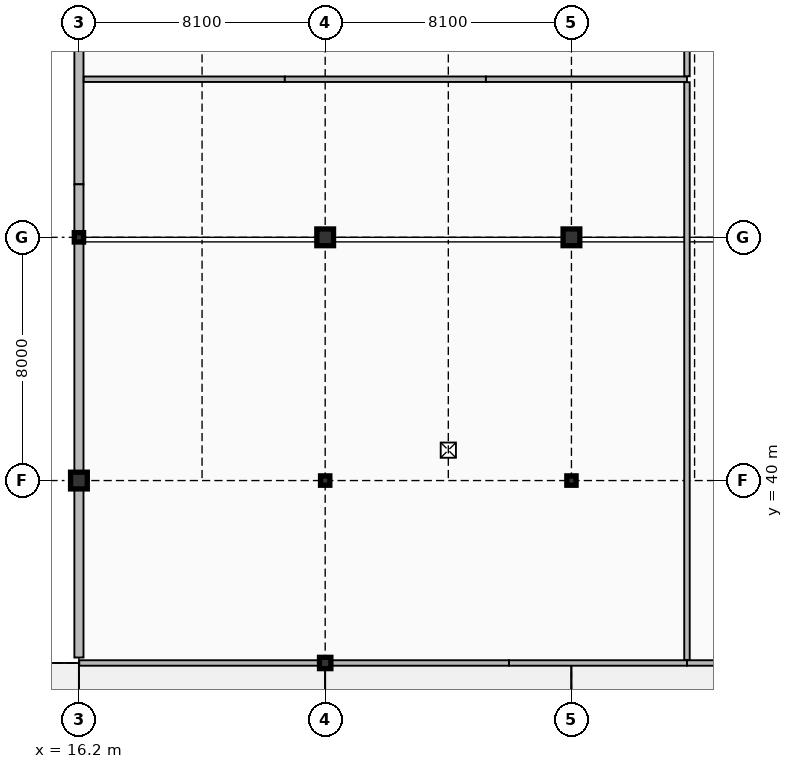
"""IFC4 building model, lengths in metres.
Left out: names, types, materials, properties, quantities, classifications, styles, units other than length and angle.
Written with IfcOpenShell. Run it as: python <this file> out.ifc"""

import sys

from ifc_helpers import new_model, si_unit, direction, frame, frame_2d, origin, origin_2d, place, context, subcontext, project, spatial, rectangle, i_section, extrude, element, fill, save


model = new_model("IFC4")
c1 = context("Model", 3, precision=1e-05, world=origin(), true_north=direction((0.0, 1.0)))
c2 = subcontext(c1, "Body", "Model", "MODEL_VIEW")
j1 = project(units=[si_unit("LENGTHUNIT", "METRE"), si_unit("PLANEANGLEUNIT", "RADIAN")], contexts=[c1])
p1 = place(None, origin())
s1 = spatial("IfcSite", under=j1, at=p1, CompositionType="ELEMENT")
p2 = place(p1, origin())
s2 = spatial("IfcBuilding", under=s1, at=p2, CompositionType="ELEMENT")
p3 = place(p2, frame((0.0, 0.0, 19.8)))
s3 = spatial("IfcBuildingStorey", under=s2, at=p3, CompositionType="ELEMENT", Elevation=19.8)
p4 = place(p3, frame((16.2, 40.0, 0.0), z_axis=(0.0, 0.0, 1.0), x_axis=(1.0, 0.0, 0.0)))
e1 = element("IfcColumn", 1, at=p4, inside=s3, PredefinedType="COLUMN", context=c2, shape_type="SweptSolid", body=[
    extrude(rectangle(XDim=0.55, YDim=0.55, at=origin_2d()), origin(), (0.0, 0.0, 1.0), 4.76),
])
p5 = place(p3, frame((16.2, 48.0, 0.0), z_axis=(0.0, 0.0, 1.0), x_axis=(1.0, 0.0, 0.0)))
e2 = element("IfcColumn", 2, at=p5, inside=s3, PredefinedType="COLUMN", context=c2, shape_type="SweptSolid", body=[
    extrude(i_section(OverallWidth=0.305, OverallDepth=0.308, WebThickness=0.01, FlangeThickness=0.015, FilletRadius=0.015, at=origin_2d()), origin(), (0.0, 0.0, 1.0), 5.1),
])
p6 = place(p3, frame((24.3, 34.0, 0.0), z_axis=(0.0, 0.0, 1.0), x_axis=(1.0, 0.0, 0.0)))
e3 = element("IfcColumn", 3, at=p6, inside=s3, PredefinedType="COLUMN", context=c2, shape_type="SweptSolid", body=[
    extrude(i_section(OverallWidth=0.374, OverallDepth=0.372, WebThickness=0.016, FlangeThickness=0.026, FilletRadius=0.016, at=origin_2d()), origin(), (0.0, 0.0, 1.0), 4.76),
])
p7 = place(p3, frame((24.3, 40.0, 0.0), z_axis=(0.0, 0.0, 1.0), x_axis=(1.0, 0.0, 0.0)))
e4 = element("IfcColumn", 4, at=p7, inside=s3, PredefinedType="COLUMN", context=c2, shape_type="SweptSolid", body=[
    extrude(i_section(OverallWidth=0.305, OverallDepth=0.308, WebThickness=0.01, FlangeThickness=0.015, FilletRadius=0.015, at=origin_2d()), origin(), (0.0, 0.0, 1.0), 4.76),
])
p8 = place(p3, frame((24.3, 48.0, 0.0), z_axis=(0.0, 0.0, 1.0), x_axis=(1.0, 0.0, 0.0)))
e5 = element("IfcColumn", 5, at=p8, inside=s3, PredefinedType="COLUMN", context=c2, shape_type="SweptSolid", body=[
    extrude(rectangle(XDim=0.55, YDim=0.55, at=origin_2d()), origin(), (0.0, 0.0, 1.0), 5.1),
])
p9 = place(p3, frame((32.4, 40.0, 0.0), z_axis=(0.0, 0.0, 1.0), x_axis=(1.0, 0.0, 0.0)))
e6 = element("IfcColumn", 6, at=p9, inside=s3, PredefinedType="COLUMN", context=c2, shape_type="SweptSolid", body=[
    extrude(i_section(OverallWidth=0.305, OverallDepth=0.308, WebThickness=0.01, FlangeThickness=0.015, FilletRadius=0.015, at=origin_2d()), origin(), (0.0, 0.0, 1.0), 4.76),
])
p10 = place(p3, frame((32.4, 48.0, 0.0), z_axis=(0.0, 0.0, 1.0), x_axis=(1.0, 0.0, 0.0)))
e7 = element("IfcColumn", 7, at=p10, inside=s3, PredefinedType="COLUMN", context=c2, shape_type="SweptSolid", body=[
    extrude(rectangle(XDim=0.55, YDim=0.55, at=origin_2d()), origin(), (0.0, 0.0, 1.0), 5.1),
])
p11 = place(p3, frame((16.2, 65.308, 0.0), z_axis=(0.0, 0.0, 1.0), x_axis=(0.0, -1.0, 0.0)))
e8 = element("IfcWall", 8, at=p11, inside=s3, PredefinedType="SOLIDWALL", context=c2, shape_type="SweptSolid", body=[
    extrude(rectangle(XDim=15.564, YDim=0.3, at=frame_2d((7.782, 0.0))), origin(), (0.0, 0.0, 1.0), 4.289),
])
p12 = place(p3, frame((16.2, 49.744, 0.0), z_axis=(0.0, 0.0, 1.0), x_axis=(0.0, -1.0, 0.0)))
e9 = element("IfcWall", 9, at=p12, inside=s3, PredefinedType="SOLIDWALL", context=c2, shape_type="SweptSolid", body=[
    extrude(rectangle(XDim=15.564, YDim=0.3, at=frame_2d((7.782, 0.0))), origin(), (0.0, 0.0, 1.0), 4.289),
])
p13 = place(p12, frame((4.5, 0.0, 0.95)))
e10 = element("IfcOpeningElement", 10, at=p13, cuts=e9, PredefinedType="OPENING", context=c2, shape_type="SweptSolid", body=[
    extrude(rectangle(XDim=1.5, YDim=1.8, at=frame_2d((0.75, 0.9))), frame((0.0, 0.16, 0.0), z_axis=(0.0, -1.0, 0.0), x_axis=(1.0, 0.0, 0.0)), (0.0, 0.0, 1.0), 0.32),
])
p14 = place(p3, frame((16.21, 34.0, 0.0), z_axis=(0.0, 0.0, 1.0), x_axis=(1.0, 0.0, 0.0)))
e11 = element("IfcWall", 11, at=p14, inside=s3, PredefinedType="PARTITIONING", context=c2, shape_type="SweptSolid", body=[
    extrude(rectangle(XDim=7.895, YDim=0.18, at=frame_2d((3.948, 0.0))), origin(), (0.0, 0.0, 1.0), 4.092),
])
p15 = place(p3, frame((24.495, 34.0, 0.0), z_axis=(0.0, 0.0, 1.0), x_axis=(1.0, 0.0, 0.0)))
e12 = element("IfcWall", 12, at=p15, inside=s3, PredefinedType="PARTITIONING", context=c2, shape_type="SweptSolid", body=[
    extrude(rectangle(XDim=5.852, YDim=0.18, at=frame_2d((2.926, 0.0))), origin(), (0.0, 0.0, 1.0), 4.092),
])
p16 = place(p3, frame((30.347, 34.0, 0.0), z_axis=(0.0, 0.0, 1.0), x_axis=(1.0, 0.0, 0.0)))
e13 = element("IfcWall", 13, at=p16, inside=s3, PredefinedType="PARTITIONING", context=c2, shape_type="SweptSolid", body=[
    extrude(rectangle(XDim=5.853, YDim=0.18, at=frame_2d((2.926, 0.0))), origin(), (0.0, 0.0, 1.0), 4.092),
])
for number, where, z_axis, x_axis in (
    (14, (16.358, 53.2, 0.0), (0.0, 0.0, 1.0), (1.0, 0.0, 0.0)),
    (15, (22.972, 53.2, 0.0), (0.0, 0.0, 1.0), (1.0, 0.0, 0.0)),
    (16, (29.586, 53.2, 0.0), (0.0, 0.0, 1.0), (1.0, 0.0, 0.0)),
):
    element("IfcWall", number, at=place(p3, frame(where, z_axis=z_axis, x_axis=x_axis)), inside=s3, PredefinedType="PARTITIONING", context=c2, shape_type="SweptSolid", body=[
        extrude(rectangle(XDim=6.614, YDim=0.18, at=frame_2d((3.307, 0.0))), origin(), (0.0, 0.0, 1.0), 4.86),
    ])
p17 = place(p3, frame((36.2, 34.0, 0.0), z_axis=(0.0, 0.0, 1.0), x_axis=(1.0, 0.0, 0.0)))
e17 = element("IfcWall", 17, at=p17, inside=s3, PredefinedType="PARTITIONING", context=c2, shape_type="SweptSolid", body=[
    extrude(rectangle(XDim=4.29, YDim=0.18, at=frame_2d((2.145, 0.0))), origin(), (0.0, 0.0, 1.0), 4.092),
])
p18 = place(p17, frame((1.545, 0.0, 0.0)))
e18 = element("IfcOpeningElement", 18, at=p18, cuts=e17, PredefinedType="OPENING", context=c2, shape_type="SweptSolid", body=[
    extrude(rectangle(XDim=1.2, YDim=2.2, at=frame_2d((0.6, 1.1))), frame((0.0, 0.1, 0.0), z_axis=(0.0, -1.0, 0.0), x_axis=(1.0, 0.0, 0.0)), (0.0, 0.0, 1.0), 0.2),
])
p19 = place(p3, frame((36.2, 34.098, 0.0), z_axis=(0.0, 0.0, 1.0), x_axis=(0.0, 1.0, 0.0)))
e19 = element("IfcWall", 19, at=p19, inside=s3, PredefinedType="PARTITIONING", context=c2, shape_type="SweptSolid", body=[
    extrude(rectangle(XDim=19.004, YDim=0.18, at=frame_2d((9.502, 0.0))), origin(), (0.0, 0.0, 1.0), 4.405),
])
p20 = place(p19, frame((9.002, 0.0, 0.0)))
e20 = element("IfcOpeningElement", 20, at=p20, cuts=e19, PredefinedType="OPENING", context=c2, shape_type="SweptSolid", body=[
    extrude(rectangle(XDim=1.0, YDim=2.2, at=frame_2d((0.5, 1.1))), frame((0.0, 0.1, 0.0), z_axis=(0.0, -1.0, 0.0), x_axis=(1.0, 0.0, 0.0)), (0.0, 0.0, 1.0), 0.2),
])
p21 = place(p3, frame((36.2, 53.298, 0.0), z_axis=(0.0, 0.0, 1.0), x_axis=(0.0, 1.0, 0.0)))
e21 = element("IfcWall", 21, at=p21, inside=s3, PredefinedType="PARTITIONING", context=c2, shape_type="SweptSolid", body=[
    extrude(rectangle(XDim=3.404, YDim=0.18, at=frame_2d((1.702, 0.0))), origin(), (0.0, 0.0, 1.0), 4.405),
])
p22 = place(p21, frame((1.152, 0.0, 0.0)))
e22 = element("IfcOpeningElement", 22, at=p22, cuts=e21, PredefinedType="OPENING", context=c2, shape_type="SweptSolid", body=[
    extrude(rectangle(XDim=1.1, YDim=2.2, at=frame_2d((0.55, 1.1))), frame((0.0, 0.1, 0.0), z_axis=(0.0, -1.0, 0.0), x_axis=(1.0, 0.0, 0.0)), (0.0, 0.0, 1.0), 0.2),
])
p23 = place(p13, origin())
e23 = element("IfcWindow", 23, at=p23, inside=s3, PartitioningType="DOUBLE_PANEL_VERTICAL", PredefinedType="WINDOW", context=c2, shape_type="SweptSolid", body=[
    extrude(rectangle(XDim=1.5, YDim=1.8, at=frame_2d((0.75, 0.9))), frame((0.0, 0.03, 0.0), z_axis=(0.0, -1.0, 0.0), x_axis=(1.0, 0.0, 0.0)), (0.0, 0.0, 1.0), 0.06),
])
fill(e10, e23)
p24 = place(p20, origin())
e24 = element("IfcDoor", 24, at=p24, inside=s3, OperationType="SINGLE_SWING_RIGHT", PredefinedType="DOOR", context=c2, shape_type="SweptSolid", body=[
    extrude(rectangle(XDim=1.0, YDim=2.2, at=frame_2d((0.5, 1.1))), frame((0.0, 0.025, 0.0), z_axis=(0.0, -1.0, 0.0), x_axis=(1.0, 0.0, 0.0)), (0.0, 0.0, 1.0), 0.05),
])
fill(e20, e24)
save(model, sys.argv[1])
